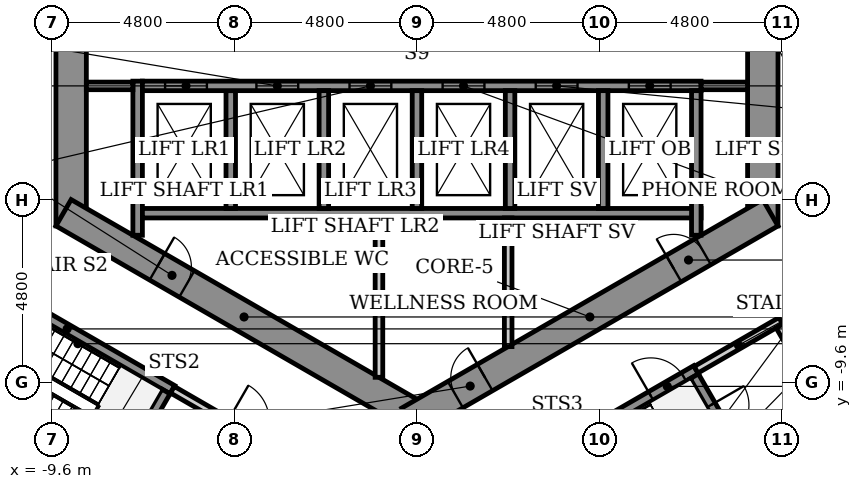
"""IFC4 building model, lengths in metres.
Left out: names, types, materials, properties, quantities, classifications, styles, units other than length and angle.
Written with IfcOpenShell. Run it as: python <this file> out.ifc"""

import sys

from ifc_helpers import new_model, si_unit, direction, frame, frame_2d, origin, place, context, subcontext, project, spatial, rectangle, extrude, element, fill, save


model = new_model("IFC4")
c1 = context("Model", 3, precision=1e-05, world=origin(), true_north=direction((0.0, 1.0)))
c2 = subcontext(c1, "Body", "Model", "MODEL_VIEW")
j1 = project(units=[si_unit("LENGTHUNIT", "METRE"), si_unit("PLANEANGLEUNIT", "RADIAN")], contexts=[c1])
p1 = place(None, origin())
s1 = spatial("IfcSite", under=j1, at=p1, CompositionType="ELEMENT")
p2 = place(p1, origin())
s2 = spatial("IfcBuilding", under=s1, at=p2, CompositionType="ELEMENT")
p3 = place(p2, origin())
s3 = spatial("IfcBuildingStorey", under=s2, at=p3, CompositionType="ELEMENT", Elevation=0.0)
p4 = place(p3, frame((9.1, -5.485, -0.5), z_axis=(0.0, 0.0, 1.0), x_axis=(0.0, 1.0, 0.0)))
e1 = element("IfcWall", 1, at=p4, inside=s3, PredefinedType="SHEAR", context=c2, shape_type="SweptSolid", body=[
    extrude(rectangle(XDim=10.97, YDim=0.8, at=frame_2d((5.485, 0.0))), origin(), (0.0, 0.0, 1.0), 7.5),
])
p5 = place(p4, frame((4.685, 0.0, 0.5)))
e2 = element("IfcOpeningElement", 2, at=p5, cuts=e1, PredefinedType="OPENING", context=c2, shape_type="SweptSolid", body=[
    extrude(rectangle(XDim=1.6, YDim=2.1, at=frame_2d((0.8, 1.05))), frame((0.0, 0.41, 0.0), z_axis=(0.0, -1.0, 0.0), x_axis=(1.0, 0.0, 0.0)), (0.0, 0.0, 1.0), 0.82),
])
p6 = place(p3, frame((-9.1, 5.485, -0.5), z_axis=(0.0, 0.0, 1.0), x_axis=(0.0, -1.0, 0.0)))
e3 = element("IfcWall", 3, at=p6, inside=s3, PredefinedType="SHEAR", context=c2, shape_type="SweptSolid", body=[
    extrude(rectangle(XDim=10.97, YDim=0.8, at=frame_2d((5.485, 0.0))), origin(), (0.0, 0.0, 1.0), 7.5),
])
p7 = place(p6, frame((4.685, 0.0, 0.5)))
e4 = element("IfcOpeningElement", 4, at=p7, cuts=e3, PredefinedType="OPENING", context=c2, shape_type="SweptSolid", body=[
    extrude(rectangle(XDim=1.6, YDim=2.1, at=frame_2d((0.8, 1.05))), frame((0.0, 0.41, 0.0), z_axis=(0.0, -1.0, 0.0), x_axis=(1.0, 0.0, 0.0)), (0.0, 0.0, 1.0), 0.82),
])
p8 = place(p3, frame((-9.3, -5.138, -0.5), z_axis=(0.0, 0.0, 1.0), x_axis=(0.866023993627, -0.500002442456, 0.0)))
e5 = element("IfcWall", 5, at=p8, inside=s3, PredefinedType="SHEAR", context=c2, shape_type="SweptSolid", body=[
    extrude(rectangle(XDim=10.97, YDim=0.8, at=frame_2d((5.485, 0.0))), origin(), (0.0, 0.0, 1.0), 7.5),
])
p9 = place(p8, frame((2.845, 0.0, 0.5)))
e6 = element("IfcOpeningElement", 6, at=p9, cuts=e5, PredefinedType="OPENING", context=c2, shape_type="SweptSolid", body=[
    extrude(rectangle(XDim=0.9, YDim=2.1, at=frame_2d((0.45, 1.05))), frame((0.0, 0.41, 0.0), z_axis=(0.0, -1.0, 0.0), x_axis=(1.0, 0.0, 0.0)), (0.0, 0.0, 1.0), 0.82),
])
p10 = place(p3, frame((-0.2, -10.623, -0.5), z_axis=(0.0, 0.0, 1.0), x_axis=(0.866023993627, 0.500002442456, 0.0)))
e7 = element("IfcWall", 7, at=p10, inside=s3, PredefinedType="SHEAR", context=c2, shape_type="SweptSolid", body=[
    extrude(rectangle(XDim=10.97, YDim=0.8, at=frame_2d((5.485, 0.0))), origin(), (0.0, 0.0, 1.0), 7.5),
])
p11 = place(p10, frame((1.398, 0.0, 0.5)))
e8 = element("IfcOpeningElement", 8, at=p11, cuts=e7, PredefinedType="OPENING", context=c2, shape_type="SweptSolid", body=[
    extrude(rectangle(XDim=0.9, YDim=2.1, at=frame_2d((0.45, 1.05))), frame((0.0, 0.41, 0.0), z_axis=(0.0, -1.0, 0.0), x_axis=(1.0, 0.0, 0.0)), (0.0, 0.0, 1.0), 0.82),
])
p12 = place(p10, frame((8.032, 0.0, 0.5)))
e9 = element("IfcOpeningElement", 9, at=p12, cuts=e7, PredefinedType="OPENING", context=c2, shape_type="SweptSolid", body=[
    extrude(rectangle(XDim=0.9, YDim=2.1, at=frame_2d((0.45, 1.05))), frame((0.0, 0.41, 0.0), z_axis=(0.0, -1.0, 0.0), x_axis=(1.0, 0.0, 0.0)), (0.0, 0.0, 1.0), 0.82),
])
p13 = place(p3, frame((-11.977, -6.595, 0.0), z_axis=(0.0, 0.0, 1.0), x_axis=(0.866025499775, -0.499999833739, 0.0)))
e10 = element("IfcWall", 10, at=p13, inside=s3, PredefinedType="SHEAR", context=c2, shape_type="SweptSolid", body=[
    extrude(rectangle(XDim=6.4, YDim=0.25, at=frame_2d((3.2, 0.0))), origin(), (0.0, 0.0, 1.0), 6.6),
])
p14 = place(p3, frame((-13.477, -9.193, 0.0), z_axis=(0.0, 0.0, 1.0), x_axis=(0.866026229868, -0.499998569178, 0.0)))
e11 = element("IfcWall", 11, at=p14, inside=s3, PredefinedType="SHEAR", context=c2, shape_type="SweptSolid", body=[
    extrude(rectangle(XDim=6.225, YDim=0.25, at=frame_2d((3.113, 0.0))), origin(), (0.0, 0.0, 1.0), 6.6),
])
p15 = place(p14, frame((4.94, 0.0, 0.0)))
e12 = element("IfcOpeningElement", 12, at=p15, cuts=e11, PredefinedType="OPENING", context=c2, shape_type="SweptSolid", body=[
    extrude(rectangle(XDim=1.0, YDim=2.1, at=frame_2d((0.5, 1.05))), frame((0.0, 0.135, 0.0), z_axis=(0.0, -1.0, 0.0), x_axis=(1.0, 0.0, 0.0)), (0.0, 0.0, 1.0), 0.27),
])
p16 = place(p3, frame((-7.35, -5.73, 0.0), z_axis=(0.0, 0.0, 1.0), x_axis=(0.0, 1.0, 0.0)))
e13 = element("IfcWall", 13, at=p16, inside=s3, PredefinedType="SHEAR", context=c2, shape_type="SweptSolid", body=[
    extrude(rectangle(XDim=4.055, YDim=0.25, at=frame_2d((2.028, 0.0))), origin(), (0.0, 0.0, 1.0), 6.6),
])
p17 = place(p3, frame((-7.475, -1.8, 0.0), z_axis=(0.0, 0.0, 1.0), x_axis=(-1.0, 0.0, 0.0)))
e14 = element("IfcWall", 14, at=p17, inside=s3, PredefinedType="PARTITIONING", context=c2, shape_type="SweptSolid", body=[
    extrude(rectangle(XDim=1.225, YDim=0.2, at=frame_2d((0.613, 0.0))), origin(), (0.0, 0.0, 1.0), 6.6),
])
p18 = place(p3, frame((-6.605, -9.841, 0.0), z_axis=(0.0, 0.0, 1.0), x_axis=(-0.500011588718, -0.866018712932, 0.0)))
e15 = element("IfcWall", 15, at=p18, inside=s3, PredefinedType="SHEAR", context=c2, shape_type="SweptSolid", body=[
    extrude(rectangle(XDim=2.875, YDim=0.25, at=frame_2d((1.438, 0.0))), origin(), (0.0, 0.0, 1.0), 6.6),
])
p19 = place(p18, frame((0.938, 0.0, 0.0)))
e16 = element("IfcOpeningElement", 16, at=p19, cuts=e15, PredefinedType="OPENING", context=c2, shape_type="SweptSolid", body=[
    extrude(rectangle(XDim=1.0, YDim=2.1, at=frame_2d((0.5, 1.05))), frame((0.0, 0.135, 0.0), z_axis=(0.0, -1.0, 0.0), x_axis=(1.0, 0.0, 0.0)), (0.0, 0.0, 1.0), 0.27),
])
p20 = place(p3, frame((-6.435, -9.795, 0.0), z_axis=(0.0, 0.0, 1.0), x_axis=(0.866012907634, -0.500021643343, 0.0)))
e17 = element("IfcWall", 17, at=p20, inside=s3, PredefinedType="PARTITIONING", context=c2, shape_type="SweptSolid", body=[
    extrude(rectangle(XDim=4.45, YDim=0.2, at=frame_2d((2.225, 0.0))), origin(), (0.0, 0.0, 1.0), 6.6),
])
p21 = place(p20, frame((1.675, 0.0, 0.0)))
e18 = element("IfcOpeningElement", 18, at=p21, cuts=e17, PredefinedType="OPENING", context=c2, shape_type="SweptSolid", body=[
    extrude(rectangle(XDim=1.1, YDim=2.1, at=frame_2d((0.55, 1.05))), frame((0.0, 0.11, 0.0), z_axis=(0.0, -1.0, 0.0), x_axis=(1.0, 0.0, 0.0)), (0.0, 0.0, 1.0), 0.22),
])
p22 = place(p3, frame((-7.225, -5.15, 0.0), z_axis=(0.0, 0.0, 1.0), x_axis=(1.0, 0.0, 0.0)))
e19 = element("IfcWall", 19, at=p22, inside=s3, PredefinedType="SHEAR", context=c2, shape_type="SweptSolid", body=[
    extrude(rectangle(XDim=14.7, YDim=0.25, at=frame_2d((7.35, 0.0))), origin(), (0.0, 0.0, 1.0), 6.6),
])
p23 = place(p3, frame((-4.9, -1.925, 0.0), z_axis=(0.0, 0.0, 1.0), x_axis=(0.0, -1.0, 0.0)))
e20 = element("IfcWall", 20, at=p23, inside=s3, PredefinedType="SHEAR", context=c2, shape_type="SweptSolid", body=[
    extrude(rectangle(XDim=3.1, YDim=0.25, at=frame_2d((1.55, 0.0))), origin(), (0.0, 0.0, 1.0), 7.0),
])
p24 = place(p3, frame((-7.225, -1.8, 0.0), z_axis=(0.0, 0.0, 1.0), x_axis=(1.0, 0.0, 0.0)))
e21 = element("IfcWall", 21, at=p24, inside=s3, PredefinedType="SHEAR", context=c2, shape_type="SweptSolid", body=[
    extrude(rectangle(XDim=14.7, YDim=0.25, at=frame_2d((7.35, 0.0))), origin(), (0.0, 0.0, 1.0), 6.6),
])
p25 = place(p24, frame((0.597, 0.0, 0.0)))
e22 = element("IfcOpeningElement", 22, at=p25, cuts=e21, PredefinedType="OPENING", context=c2, shape_type="SweptSolid", body=[
    extrude(rectangle(XDim=1.1, YDim=2.1, at=frame_2d((0.55, 1.05))), frame((0.0, 0.135, 0.0), z_axis=(0.0, -1.0, 0.0), x_axis=(1.0, 0.0, 0.0)), (0.0, 0.0, 1.0), 0.27),
])
p26 = place(p24, frame((3.0, 0.0, 0.0)))
e23 = element("IfcOpeningElement", 23, at=p26, cuts=e21, PredefinedType="OPENING", context=c2, shape_type="SweptSolid", body=[
    extrude(rectangle(XDim=1.1, YDim=2.1, at=frame_2d((0.55, 1.05))), frame((0.0, 0.135, 0.0), z_axis=(0.0, -1.0, 0.0), x_axis=(1.0, 0.0, 0.0)), (0.0, 0.0, 1.0), 0.27),
])
p27 = place(p24, frame((5.45, 0.0, 0.0)))
e24 = element("IfcOpeningElement", 24, at=p27, cuts=e21, PredefinedType="OPENING", context=c2, shape_type="SweptSolid", body=[
    extrude(rectangle(XDim=1.1, YDim=2.1, at=frame_2d((0.55, 1.05))), frame((0.0, 0.135, 0.0), z_axis=(0.0, -1.0, 0.0), x_axis=(1.0, 0.0, 0.0)), (0.0, 0.0, 1.0), 0.27),
])
p28 = place(p24, frame((7.9, 0.0, 0.0)))
e25 = element("IfcOpeningElement", 25, at=p28, cuts=e21, PredefinedType="OPENING", context=c2, shape_type="SweptSolid", body=[
    extrude(rectangle(XDim=1.1, YDim=2.1, at=frame_2d((0.55, 1.05))), frame((0.0, 0.135, 0.0), z_axis=(0.0, -1.0, 0.0), x_axis=(1.0, 0.0, 0.0)), (0.0, 0.0, 1.0), 0.27),
])
p29 = place(p24, frame((10.35, 0.0, 0.0)))
e26 = element("IfcOpeningElement", 26, at=p29, cuts=e21, PredefinedType="OPENING", context=c2, shape_type="SweptSolid", body=[
    extrude(rectangle(XDim=1.1, YDim=2.1, at=frame_2d((0.55, 1.05))), frame((0.0, 0.135, 0.0), z_axis=(0.0, -1.0, 0.0), x_axis=(1.0, 0.0, 0.0)), (0.0, 0.0, 1.0), 0.27),
])
p30 = place(p24, frame((12.8, 0.0, 0.0)))
e27 = element("IfcOpeningElement", 27, at=p30, cuts=e21, PredefinedType="OPENING", context=c2, shape_type="SweptSolid", body=[
    extrude(rectangle(XDim=1.1, YDim=2.1, at=frame_2d((0.55, 1.05))), frame((0.0, 0.135, 0.0), z_axis=(0.0, -1.0, 0.0), x_axis=(1.0, 0.0, 0.0)), (0.0, 0.0, 1.0), 0.27),
])
p31 = place(p3, frame((-2.45, -1.925, 0.0), z_axis=(0.0, 0.0, 1.0), x_axis=(0.0, -1.0, 0.0)))
e28 = element("IfcWall", 28, at=p31, inside=s3, PredefinedType="SHEAR", context=c2, shape_type="SweptSolid", body=[
    extrude(rectangle(XDim=3.1, YDim=0.25, at=frame_2d((1.55, 0.0))), origin(), (0.0, 0.0, 1.0), 7.0),
])
p32 = place(p3, frame((-1.0, -5.275, 0.0), z_axis=(0.0, 0.0, 1.0), x_axis=(0.0, -1.0, 0.0)))
e29 = element("IfcWall", 29, at=p32, inside=s3, PredefinedType="PARTITIONING", context=c2, shape_type="SweptSolid", body=[
    extrude(rectangle(XDim=4.194, YDim=0.2, at=frame_2d((2.097, 0.0))), origin(), (0.0, 0.0, 1.0), 6.6),
])
p33 = place(p3, frame((0.0, -1.925, 0.0), z_axis=(0.0, 0.0, 1.0), x_axis=(0.0, -1.0, 0.0)))
e30 = element("IfcWall", 30, at=p33, inside=s3, PredefinedType="SHEAR", context=c2, shape_type="SweptSolid", body=[
    extrude(rectangle(XDim=3.1, YDim=0.25, at=frame_2d((1.55, 0.0))), origin(), (0.0, 0.0, 1.0), 7.0),
])
p34 = place(p3, frame((1.585, -12.595, 0.0), z_axis=(0.0, 0.0, 1.0), x_axis=(0.866036417653, 0.499980922934, 0.0)))
e31 = element("IfcWall", 31, at=p34, inside=s3, PredefinedType="SHEAR", context=c2, shape_type="SweptSolid", body=[
    extrude(rectangle(XDim=6.65, YDim=0.25, at=frame_2d((3.325, 0.0))), origin(), (0.0, 0.0, 1.0), 6.6),
])
p35 = place(p34, frame((5.275, 0.0, 0.0)))
e32 = element("IfcOpeningElement", 32, at=p35, cuts=e31, PredefinedType="OPENING", context=c2, shape_type="SweptSolid", body=[
    extrude(rectangle(XDim=1.0, YDim=2.1, at=frame_2d((0.5, 1.05))), frame((0.0, 0.135, 0.0), z_axis=(0.0, -1.0, 0.0), x_axis=(1.0, 0.0, 0.0)), (0.0, 0.0, 1.0), 0.27),
])
p36 = place(p3, frame((2.4, -5.275, 0.0), z_axis=(0.0, 0.0, 1.0), x_axis=(0.0, -1.0, 0.0)))
e33 = element("IfcWall", 33, at=p36, inside=s3, PredefinedType="PARTITIONING", context=c2, shape_type="SweptSolid", body=[
    extrude(rectangle(XDim=3.385, YDim=0.2, at=frame_2d((1.693, 0.0))), origin(), (0.0, 0.0, 1.0), 6.6),
])
for number, where, z_axis, x_axis in (
    (34, (2.45, -1.925, 0.0), (0.0, 0.0, 1.0), (0.0, -1.0, 0.0)),
    (35, (4.9, -1.925, 0.0), (0.0, 0.0, 1.0), (0.0, -1.0, 0.0)),
):
    element("IfcWall", number, at=place(p3, frame(where, z_axis=z_axis, x_axis=x_axis)), inside=s3, PredefinedType="SHEAR", context=c2, shape_type="SweptSolid", body=[
        extrude(rectangle(XDim=3.1, YDim=0.25, at=frame_2d((1.55, 0.0))), origin(), (0.0, 0.0, 1.0), 7.0),
    ])
p37 = place(p3, frame((7.298, -9.441, 0.0), z_axis=(0.0, 0.0, 1.0), x_axis=(0.500034990121, -0.866005201286, 0.0)))
e36 = element("IfcWall", 36, at=p37, inside=s3, PredefinedType="SHEAR", context=c2, shape_type="SweptSolid", body=[
    extrude(rectangle(XDim=2.75, YDim=0.25, at=frame_2d((1.375, 0.0))), origin(), (0.0, 0.0, 1.0), 6.6),
])
p38 = place(p37, frame((0.875, 0.0, 0.0)))
e37 = element("IfcOpeningElement", 37, at=p38, cuts=e36, PredefinedType="OPENING", context=c2, shape_type="SweptSolid", body=[
    extrude(rectangle(XDim=1.0, YDim=2.1, at=frame_2d((0.5, 1.05))), frame((0.0, 0.135, 0.0), z_axis=(0.0, -1.0, 0.0), x_axis=(1.0, 0.0, 0.0)), (0.0, 0.0, 1.0), 0.27),
])
p39 = place(p3, frame((7.344, -9.27, 0.0), z_axis=(0.0, 0.0, 1.0), x_axis=(0.866005588531, 0.500034319456, 0.0)))
e38 = element("IfcWall", 38, at=p39, inside=s3, PredefinedType="PARTITIONING", context=c2, shape_type="SweptSolid", body=[
    extrude(rectangle(XDim=2.575, YDim=0.2, at=frame_2d((1.288, 0.0))), origin(), (0.0, 0.0, 1.0), 6.6),
])
p40 = place(p3, frame((7.35, -1.925, 0.0), z_axis=(0.0, 0.0, 1.0), x_axis=(0.0, -1.0, 0.0)))
e39 = element("IfcWall", 39, at=p40, inside=s3, PredefinedType="SHEAR", context=c2, shape_type="SweptSolid", body=[
    extrude(rectangle(XDim=3.805, YDim=0.25, at=frame_2d((1.903, 0.0))), origin(), (0.0, 0.0, 1.0), 6.6),
])
p41 = place(p3, frame((8.7, -1.8, 0.0), z_axis=(0.0, 0.0, 1.0), x_axis=(-1.0, 0.0, 0.0)))
e40 = element("IfcWall", 40, at=p41, inside=s3, PredefinedType="PARTITIONING", context=c2, shape_type="SweptSolid", body=[
    extrude(rectangle(XDim=1.225, YDim=0.2, at=frame_2d((0.613, 0.0))), origin(), (0.0, 0.0, 1.0), 6.6),
])
p42 = place(p3, frame((9.537, -8.119, 0.0), z_axis=(0.0, 0.0, 1.0), x_axis=(0.499990139034, -0.866031096941, 0.0)))
e41 = element("IfcWall", 41, at=p42, inside=s3, PredefinedType="PARTITIONING", context=c2, shape_type="SweptSolid", body=[
    extrude(rectangle(XDim=3.0, YDim=0.2, at=frame_2d((1.5, 0.0))), origin(), (0.0, 0.0, 1.0), 6.6),
])
p43 = place(p42, frame((0.935, 0.0, 0.0)))
e42 = element("IfcOpeningElement", 42, at=p43, cuts=e41, PredefinedType="OPENING", context=c2, shape_type="SweptSolid", body=[
    extrude(rectangle(XDim=1.0, YDim=2.1, at=frame_2d((0.5, 1.05))), frame((0.0, 0.11, 0.0), z_axis=(0.0, -1.0, 0.0), x_axis=(1.0, 0.0, 0.0)), (0.0, 0.0, 1.0), 0.22),
])
p44 = place(p25, origin())
e43 = element("IfcDoor", 43, at=p44, inside=s3, OperationType="SLIDING_TO_LEFT", PredefinedType="DOOR", context=c2, shape_type="SweptSolid", body=[
    extrude(rectangle(XDim=1.1, YDim=2.1, at=frame_2d((0.55, 1.05))), frame((0.0, 0.025, 0.0), z_axis=(0.0, -1.0, 0.0), x_axis=(1.0, 0.0, 0.0)), (0.0, 0.0, 1.0), 0.05),
])
fill(e22, e43)
p45 = place(p26, origin())
e44 = element("IfcDoor", 44, at=p45, inside=s3, OperationType="SLIDING_TO_LEFT", PredefinedType="DOOR", context=c2, shape_type="SweptSolid", body=[
    extrude(rectangle(XDim=1.1, YDim=2.1, at=frame_2d((0.55, 1.05))), frame((0.0, 0.025, 0.0), z_axis=(0.0, -1.0, 0.0), x_axis=(1.0, 0.0, 0.0)), (0.0, 0.0, 1.0), 0.05),
])
fill(e23, e44)
p46 = place(p27, origin())
e45 = element("IfcDoor", 45, at=p46, inside=s3, OperationType="SLIDING_TO_LEFT", PredefinedType="DOOR", context=c2, shape_type="SweptSolid", body=[
    extrude(rectangle(XDim=1.1, YDim=2.1, at=frame_2d((0.55, 1.05))), frame((0.0, 0.025, 0.0), z_axis=(0.0, -1.0, 0.0), x_axis=(1.0, 0.0, 0.0)), (0.0, 0.0, 1.0), 0.05),
])
fill(e24, e45)
p47 = place(p28, origin())
e46 = element("IfcDoor", 46, at=p47, inside=s3, OperationType="SLIDING_TO_LEFT", PredefinedType="DOOR", context=c2, shape_type="SweptSolid", body=[
    extrude(rectangle(XDim=1.1, YDim=2.1, at=frame_2d((0.55, 1.05))), frame((0.0, 0.025, 0.0), z_axis=(0.0, -1.0, 0.0), x_axis=(1.0, 0.0, 0.0)), (0.0, 0.0, 1.0), 0.05),
])
fill(e25, e46)
p48 = place(p29, origin())
e47 = element("IfcDoor", 47, at=p48, inside=s3, OperationType="SLIDING_TO_LEFT", PredefinedType="DOOR", context=c2, shape_type="SweptSolid", body=[
    extrude(rectangle(XDim=1.1, YDim=2.1, at=frame_2d((0.55, 1.05))), frame((0.0, 0.025, 0.0), z_axis=(0.0, -1.0, 0.0), x_axis=(1.0, 0.0, 0.0)), (0.0, 0.0, 1.0), 0.05),
])
fill(e26, e47)
p49 = place(p30, origin())
e48 = element("IfcDoor", 48, at=p49, inside=s3, OperationType="SLIDING_TO_LEFT", PredefinedType="DOOR", context=c2, shape_type="SweptSolid", body=[
    extrude(rectangle(XDim=1.1, YDim=2.1, at=frame_2d((0.55, 1.05))), frame((0.0, 0.025, 0.0), z_axis=(0.0, -1.0, 0.0), x_axis=(1.0, 0.0, 0.0)), (0.0, 0.0, 1.0), 0.05),
])
fill(e27, e48)
p50 = place(p35, origin())
e49 = element("IfcDoor", 49, at=p50, inside=s3, OperationType="SINGLE_SWING_LEFT", PredefinedType="DOOR", context=c2, shape_type="SweptSolid", body=[
    extrude(rectangle(XDim=1.0, YDim=2.1, at=frame_2d((0.5, 1.05))), frame((0.0, 0.025, 0.0), z_axis=(0.0, -1.0, 0.0), x_axis=(1.0, 0.0, 0.0)), (0.0, 0.0, 1.0), 0.05),
])
fill(e32, e49)
p51 = place(p38, origin())
e50 = element("IfcDoor", 50, at=p51, inside=s3, OperationType="SINGLE_SWING_LEFT", PredefinedType="DOOR", context=c2, shape_type="SweptSolid", body=[
    extrude(rectangle(XDim=1.0, YDim=2.1, at=frame_2d((0.5, 1.05))), frame((0.0, 0.025, 0.0), z_axis=(0.0, -1.0, 0.0), x_axis=(1.0, 0.0, 0.0)), (0.0, 0.0, 1.0), 0.05),
])
fill(e37, e50)
p52 = place(p9, origin())
e51 = element("IfcDoor", 51, at=p52, inside=s3, OperationType="SINGLE_SWING_LEFT", PredefinedType="DOOR", context=c2, shape_type="SweptSolid", body=[
    extrude(rectangle(XDim=0.9, YDim=2.1, at=frame_2d((0.45, 1.05))), frame((0.0, 0.025, 0.0), z_axis=(0.0, -1.0, 0.0), x_axis=(1.0, 0.0, 0.0)), (0.0, 0.0, 1.0), 0.05),
])
fill(e6, e51)
p53 = place(p11, origin())
e52 = element("IfcDoor", 52, at=p53, inside=s3, OperationType="SINGLE_SWING_RIGHT", PredefinedType="DOOR", context=c2, shape_type="SweptSolid", body=[
    extrude(rectangle(XDim=0.9, YDim=2.1, at=frame_2d((0.45, 1.05))), frame((0.0, 0.025, 0.0), z_axis=(0.0, -1.0, 0.0), x_axis=(1.0, 0.0, 0.0)), (0.0, 0.0, 1.0), 0.05),
])
fill(e8, e52)
p54 = place(p12, origin())
e53 = element("IfcDoor", 53, at=p54, inside=s3, OperationType="SINGLE_SWING_LEFT", PredefinedType="DOOR", context=c2, shape_type="SweptSolid", body=[
    extrude(rectangle(XDim=0.9, YDim=2.1, at=frame_2d((0.45, 1.05))), frame((0.0, 0.025, 0.0), z_axis=(0.0, -1.0, 0.0), x_axis=(1.0, 0.0, 0.0)), (0.0, 0.0, 1.0), 0.05),
])
fill(e9, e53)
save(model, sys.argv[1])
